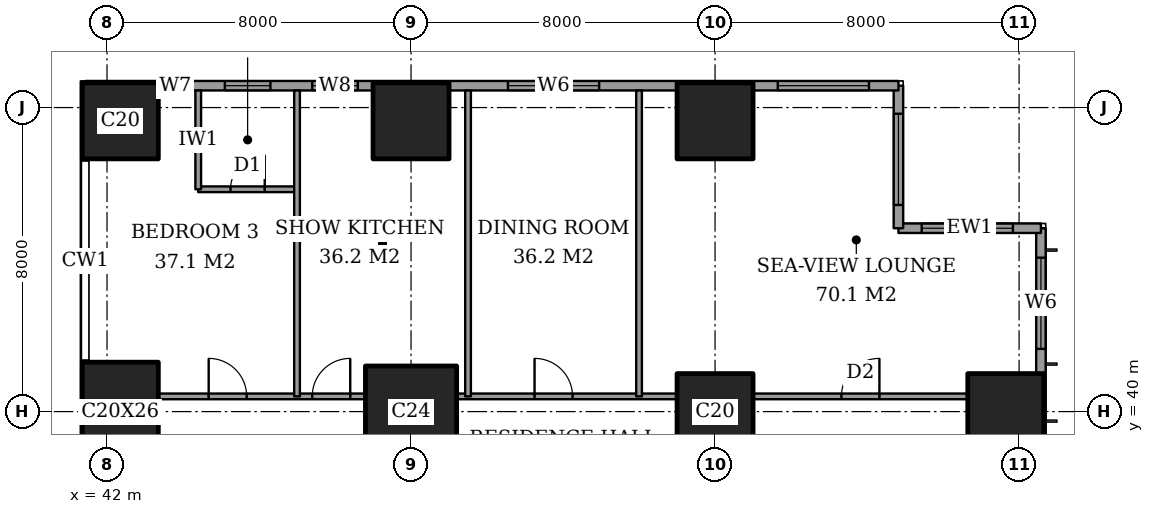
"""IFC4 building model, lengths in metres.
Left out: names, types, materials, properties, quantities, classifications, styles, units other than length and angle.
Written with IfcOpenShell. Run it as: python <this file> out.ifc"""

import sys

from ifc_helpers import new_model, si_unit, direction, frame, frame_2d, origin, origin_2d, place, context, subcontext, project, spatial, rectangle, extrude, element, fill, save


model = new_model("IFC4")
c1 = context("Model", 3, precision=1e-05, world=origin(), true_north=direction((0.0, 1.0)))
c2 = subcontext(c1, "Body", "Model", "MODEL_VIEW")
j1 = project(units=[si_unit("LENGTHUNIT", "METRE"), si_unit("PLANEANGLEUNIT", "RADIAN")], contexts=[c1])
p1 = place(None, origin())
s1 = spatial("IfcSite", under=j1, at=p1, CompositionType="ELEMENT")
p2 = place(p1, origin())
s2 = spatial("IfcBuilding", under=s1, at=p2, CompositionType="ELEMENT")
p3 = place(p2, frame((0.0, 0.0, 76.4)))
s3 = spatial("IfcBuildingStorey", under=s2, at=p3, CompositionType="ELEMENT", Elevation=76.4)
p4 = place(p3, frame((42.35, 40.0, 0.0), z_axis=(0.0, 0.0, 1.0), x_axis=(1.0, 0.0, 0.0)))
e1 = element("IfcColumn", 1, at=p4, inside=s3, PredefinedType="COLUMN", context=c2, shape_type="SweptSolid", body=[
    extrude(rectangle(XDim=2.0, YDim=2.6, at=origin_2d()), origin(), (0.0, 0.0, 1.0), 3.6),
])
p5 = place(p3, frame((42.35, 47.65, 0.0), z_axis=(0.0, 0.0, 1.0), x_axis=(1.0, 0.0, 0.0)))
e2 = element("IfcColumn", 2, at=p5, inside=s3, PredefinedType="COLUMN", context=c2, shape_type="SweptSolid", body=[
    extrude(rectangle(XDim=2.0, YDim=2.0, at=origin_2d()), origin(), (0.0, 0.0, 1.0), 3.6),
])
p6 = place(p3, frame((50.0, 40.0, 0.0), z_axis=(0.0, 0.0, 1.0), x_axis=(1.0, 0.0, 0.0)))
e3 = element("IfcColumn", 3, at=p6, inside=s3, PredefinedType="COLUMN", context=c2, shape_type="SweptSolid", body=[
    extrude(rectangle(XDim=2.4, YDim=2.4, at=origin_2d()), origin(), (0.0, 0.0, 1.0), 3.6),
])
for number, where, z_axis, x_axis in (
    (4, (50.0, 47.65, 0.0), (0.0, 0.0, 1.0), (1.0, 0.0, 0.0)),
    (5, (58.0, 40.0, 0.0), (0.0, 0.0, 1.0), (1.0, 0.0, 0.0)),
    (6, (58.0, 47.65, 0.0), (0.0, 0.0, 1.0), (1.0, 0.0, 0.0)),
    (7, (65.65, 40.0, 0.0), (0.0, 0.0, 1.0), (1.0, 0.0, 0.0)),
):
    element("IfcColumn", number, at=place(p3, frame(where, z_axis=z_axis, x_axis=x_axis)), inside=s3, PredefinedType="COLUMN", context=c2, shape_type="SweptSolid", body=[
        extrude(rectangle(XDim=2.0, YDim=2.0, at=origin_2d()), origin(), (0.0, 0.0, 1.0), 3.6),
    ])
p7 = place(p3, frame((66.575, 3.175, 0.0), z_axis=(0.0, 0.0, 1.0), x_axis=(0.0, 1.0, 0.0)))
e8 = element("IfcWall", 8, at=p7, inside=s3, PredefinedType="SOLIDWALL", context=c2, shape_type="SweptSolid", body=[
    extrude(rectangle(XDim=41.65, YDim=0.25, at=frame_2d((20.825, 0.0))), origin(), (0.0, 0.0, 1.0), 3.6),
])
p8 = place(p7, frame((0.775, 0.0, 0.6)))
e9 = element("IfcOpeningElement", 9, at=p8, cuts=e8, PredefinedType="OPENING", context=c2, shape_type="SweptSolid", body=[
    extrude(rectangle(XDim=2.4, YDim=2.0, at=frame_2d((1.2, 1.0))), frame((0.0, 0.135, 0.0), z_axis=(0.0, -1.0, 0.0), x_axis=(1.0, 0.0, 0.0)), (0.0, 0.0, 1.0), 0.27),
])
p9 = place(p7, frame((6.1, 0.0, 0.6)))
e10 = element("IfcOpeningElement", 10, at=p9, cuts=e8, PredefinedType="OPENING", context=c2, shape_type="SweptSolid", body=[
    extrude(rectangle(XDim=1.2, YDim=2.0, at=frame_2d((0.6, 1.0))), frame((0.0, 0.135, 0.0), z_axis=(0.0, -1.0, 0.0), x_axis=(1.0, 0.0, 0.0)), (0.0, 0.0, 1.0), 0.27),
])
p10 = place(p7, frame((8.275, 0.0, 0.6)))
e11 = element("IfcOpeningElement", 11, at=p10, cuts=e8, PredefinedType="OPENING", context=c2, shape_type="SweptSolid", body=[
    extrude(rectangle(XDim=2.4, YDim=2.0, at=frame_2d((1.2, 1.0))), frame((0.0, 0.135, 0.0), z_axis=(0.0, -1.0, 0.0), x_axis=(1.0, 0.0, 0.0)), (0.0, 0.0, 1.0), 0.27),
])
p11 = place(p7, frame((15.775, 0.0, 0.6)))
e12 = element("IfcOpeningElement", 12, at=p11, cuts=e8, PredefinedType="OPENING", context=c2, shape_type="SweptSolid", body=[
    extrude(rectangle(XDim=2.4, YDim=2.0, at=frame_2d((1.2, 1.0))), frame((0.0, 0.135, 0.0), z_axis=(0.0, -1.0, 0.0), x_axis=(1.0, 0.0, 0.0)), (0.0, 0.0, 1.0), 0.27),
])
p12 = place(p7, frame((23.475, 0.0, 0.6)))
e13 = element("IfcOpeningElement", 13, at=p12, cuts=e8, PredefinedType="OPENING", context=c2, shape_type="SweptSolid", body=[
    extrude(rectangle(XDim=2.4, YDim=2.0, at=frame_2d((1.2, 1.0))), frame((0.0, 0.135, 0.0), z_axis=(0.0, -1.0, 0.0), x_axis=(1.0, 0.0, 0.0)), (0.0, 0.0, 1.0), 0.27),
])
p13 = place(p7, frame((30.975, 0.0, 0.6)))
e14 = element("IfcOpeningElement", 14, at=p13, cuts=e8, PredefinedType="OPENING", context=c2, shape_type="SweptSolid", body=[
    extrude(rectangle(XDim=2.4, YDim=2.0, at=frame_2d((1.2, 1.0))), frame((0.0, 0.135, 0.0), z_axis=(0.0, -1.0, 0.0), x_axis=(1.0, 0.0, 0.0)), (0.0, 0.0, 1.0), 0.27),
])
p14 = place(p7, frame((34.5, 0.0, 0.6)))
e15 = element("IfcOpeningElement", 15, at=p14, cuts=e8, PredefinedType="OPENING", context=c2, shape_type="SweptSolid", body=[
    extrude(rectangle(XDim=1.2, YDim=2.0, at=frame_2d((0.6, 1.0))), frame((0.0, 0.135, 0.0), z_axis=(0.0, -1.0, 0.0), x_axis=(1.0, 0.0, 0.0)), (0.0, 0.0, 1.0), 0.27),
])
p15 = place(p7, frame((38.475, 0.0, 0.6)))
e16 = element("IfcOpeningElement", 16, at=p15, cuts=e8, PredefinedType="OPENING", context=c2, shape_type="SweptSolid", body=[
    extrude(rectangle(XDim=2.4, YDim=2.0, at=frame_2d((1.2, 1.0))), frame((0.0, 0.135, 0.0), z_axis=(0.0, -1.0, 0.0), x_axis=(1.0, 0.0, 0.0)), (0.0, 0.0, 1.0), 0.27),
])
p16 = place(p3, frame((66.575, 44.825, 0.0), z_axis=(0.0, 0.0, 1.0), x_axis=(-1.0, 0.0, 0.0)))
e17 = element("IfcWall", 17, at=p16, inside=s3, PredefinedType="SOLIDWALL", context=c2, shape_type="SweptSolid", body=[
    extrude(rectangle(XDim=3.75, YDim=0.25, at=frame_2d((1.875, 0.0))), origin(), (0.0, 0.0, 1.0), 3.6),
])
p17 = place(p16, frame((0.738, 0.0, 0.6)))
e18 = element("IfcOpeningElement", 18, at=p17, cuts=e17, PredefinedType="OPENING", context=c2, shape_type="SweptSolid", body=[
    extrude(rectangle(XDim=2.4, YDim=2.0, at=frame_2d((1.2, 1.0))), frame((0.0, 0.135, 0.0), z_axis=(0.0, -1.0, 0.0), x_axis=(1.0, 0.0, 0.0)), (0.0, 0.0, 1.0), 0.27),
])
p18 = place(p3, frame((62.825, 44.825, 0.0), z_axis=(0.0, 0.0, 1.0), x_axis=(0.0, 1.0, 0.0)))
e19 = element("IfcWall", 19, at=p18, inside=s3, PredefinedType="SOLIDWALL", context=c2, shape_type="SweptSolid", body=[
    extrude(rectangle(XDim=3.75, YDim=0.25, at=frame_2d((1.875, 0.0))), origin(), (0.0, 0.0, 1.0), 3.6),
])
p19 = place(p18, frame((0.613, 0.0, 0.6)))
e20 = element("IfcOpeningElement", 20, at=p19, cuts=e19, PredefinedType="OPENING", context=c2, shape_type="SweptSolid", body=[
    extrude(rectangle(XDim=2.4, YDim=2.0, at=frame_2d((1.2, 1.0))), frame((0.0, 0.135, 0.0), z_axis=(0.0, -1.0, 0.0), x_axis=(1.0, 0.0, 0.0)), (0.0, 0.0, 1.0), 0.27),
])
p20 = place(p3, frame((62.825, 48.575, 0.0), z_axis=(0.0, 0.0, 1.0), x_axis=(-1.0, 0.0, 0.0)))
e21 = element("IfcWall", 21, at=p20, inside=s3, PredefinedType="SOLIDWALL", context=c2, shape_type="SweptSolid", body=[
    extrude(rectangle(XDim=21.4, YDim=0.25, at=frame_2d((10.7, 0.0))), origin(), (0.0, 0.0, 1.0), 3.6),
])
p21 = place(p20, frame((0.775, 0.0, 0.6)))
e22 = element("IfcOpeningElement", 22, at=p21, cuts=e21, PredefinedType="OPENING", context=c2, shape_type="SweptSolid", body=[
    extrude(rectangle(XDim=2.4, YDim=2.0, at=frame_2d((1.2, 1.0))), frame((0.0, 0.135, 0.0), z_axis=(0.0, -1.0, 0.0), x_axis=(1.0, 0.0, 0.0)), (0.0, 0.0, 1.0), 0.27),
])
p22 = place(p20, frame((7.875, 0.0, 0.6)))
e23 = element("IfcOpeningElement", 23, at=p22, cuts=e21, PredefinedType="OPENING", context=c2, shape_type="SweptSolid", body=[
    extrude(rectangle(XDim=2.4, YDim=2.0, at=frame_2d((1.2, 1.0))), frame((0.0, 0.135, 0.0), z_axis=(0.0, -1.0, 0.0), x_axis=(1.0, 0.0, 0.0)), (0.0, 0.0, 1.0), 0.27),
])
p23 = place(p20, frame((14.225, 0.0, 0.6)))
e24 = element("IfcOpeningElement", 24, at=p23, cuts=e21, PredefinedType="OPENING", context=c2, shape_type="SweptSolid", body=[
    extrude(rectangle(XDim=1.2, YDim=2.0, at=frame_2d((0.6, 1.0))), frame((0.0, 0.135, 0.0), z_axis=(0.0, -1.0, 0.0), x_axis=(1.0, 0.0, 0.0)), (0.0, 0.0, 1.0), 0.27),
])
p24 = place(p20, frame((16.525, 0.0, 0.6)))
e25 = element("IfcOpeningElement", 25, at=p24, cuts=e21, PredefinedType="OPENING", context=c2, shape_type="SweptSolid", body=[
    extrude(rectangle(XDim=1.2, YDim=2.0, at=frame_2d((0.6, 1.0))), frame((0.0, 0.135, 0.0), z_axis=(0.0, -1.0, 0.0), x_axis=(1.0, 0.0, 0.0)), (0.0, 0.0, 1.0), 0.27),
])
p25 = place(p20, frame((18.725, 0.0, 0.6)))
e26 = element("IfcOpeningElement", 26, at=p25, cuts=e21, PredefinedType="OPENING", context=c2, shape_type="SweptSolid", body=[
    extrude(rectangle(XDim=0.6, YDim=2.0, at=frame_2d((0.3, 1.0))), frame((0.0, 0.135, 0.0), z_axis=(0.0, -1.0, 0.0), x_axis=(1.0, 0.0, 0.0)), (0.0, 0.0, 1.0), 0.27),
])
p26 = place(p3, frame((43.35, 40.4, 0.0), z_axis=(0.0, 0.0, 1.0), x_axis=(1.0, 0.0, 0.0)))
e27 = element("IfcWall", 27, at=p26, inside=s3, PredefinedType="PARTITIONING", context=c2, shape_type="SweptSolid", body=[
    extrude(rectangle(XDim=5.45, YDim=0.15, at=frame_2d((2.725, 0.0))), origin(), (0.0, 0.0, 1.0), 3.35),
])
p27 = place(p26, frame((4.05, 0.0, 0.0)))
e28 = element("IfcOpeningElement", 28, at=p27, cuts=e27, PredefinedType="OPENING", context=c2, shape_type="SweptSolid", body=[
    extrude(rectangle(XDim=1.0, YDim=2.1, at=frame_2d((0.5, 1.05))), frame((0.0, 0.085, 0.0), z_axis=(0.0, -1.0, 0.0), x_axis=(1.0, 0.0, 0.0)), (0.0, 0.0, 1.0), 0.17),
])
p28 = place(p26, frame((1.325, 0.0, 0.0)))
e29 = element("IfcOpeningElement", 29, at=p28, cuts=e27, PredefinedType="OPENING", context=c2, shape_type="SweptSolid", body=[
    extrude(rectangle(XDim=1.0, YDim=2.1, at=frame_2d((0.5, 1.05))), frame((0.0, 0.085, 0.0), z_axis=(0.0, -1.0, 0.0), x_axis=(1.0, 0.0, 0.0)), (0.0, 0.0, 1.0), 0.17),
])
p29 = place(p3, frame((51.2, 40.4, 0.0), z_axis=(0.0, 0.0, 1.0), x_axis=(1.0, 0.0, 0.0)))
e30 = element("IfcWall", 30, at=p29, inside=s3, PredefinedType="PARTITIONING", context=c2, shape_type="SweptSolid", body=[
    extrude(rectangle(XDim=5.8, YDim=0.15, at=frame_2d((2.9, 0.0))), origin(), (0.0, 0.0, 1.0), 3.35),
])
p30 = place(p29, frame((2.05, 0.0, 0.0)))
e31 = element("IfcOpeningElement", 31, at=p30, cuts=e30, PredefinedType="OPENING", context=c2, shape_type="SweptSolid", body=[
    extrude(rectangle(XDim=1.0, YDim=2.1, at=frame_2d((0.5, 1.05))), frame((0.0, 0.085, 0.0), z_axis=(0.0, -1.0, 0.0), x_axis=(1.0, 0.0, 0.0)), (0.0, 0.0, 1.0), 0.17),
])
p31 = place(p3, frame((59.0, 40.4, 0.0), z_axis=(0.0, 0.0, 1.0), x_axis=(1.0, 0.0, 0.0)))
e32 = element("IfcWall", 32, at=p31, inside=s3, PredefinedType="PARTITIONING", context=c2, shape_type="SweptSolid", body=[
    extrude(rectangle(XDim=5.65, YDim=0.15, at=frame_2d((2.825, 0.0))), origin(), (0.0, 0.0, 1.0), 3.35),
])
p32 = place(p31, frame((2.325, 0.0, 0.0)))
e33 = element("IfcOpeningElement", 33, at=p32, cuts=e32, PredefinedType="OPENING", context=c2, shape_type="SweptSolid", body=[
    extrude(rectangle(XDim=1.0, YDim=2.1, at=frame_2d((0.5, 1.05))), frame((0.0, 0.085, 0.0), z_axis=(0.0, -1.0, 0.0), x_axis=(1.0, 0.0, 0.0)), (0.0, 0.0, 1.0), 0.17),
])
p33 = place(p3, frame((44.4, 45.85, 0.0), z_axis=(0.0, 0.0, 1.0), x_axis=(1.0, 0.0, 0.0)))
e34 = element("IfcWall", 34, at=p33, inside=s3, PredefinedType="PARTITIONING", context=c2, shape_type="SweptSolid", body=[
    extrude(rectangle(XDim=2.6, YDim=0.15, at=frame_2d((1.3, 0.0))), origin(), (0.0, 0.0, 1.0), 3.35),
])
p34 = place(p33, frame((0.85, 0.0, 0.0)))
e35 = element("IfcOpeningElement", 35, at=p34, cuts=e34, PredefinedType="OPENING", context=c2, shape_type="SweptSolid", body=[
    extrude(rectangle(XDim=0.9, YDim=2.1, at=frame_2d((0.45, 1.05))), frame((0.0, 0.085, 0.0), z_axis=(0.0, -1.0, 0.0), x_axis=(1.0, 0.0, 0.0)), (0.0, 0.0, 1.0), 0.17),
])
p35 = place(p3, frame((44.4, 45.85, 0.0), z_axis=(0.0, 0.0, 1.0), x_axis=(0.0, 1.0, 0.0)))
e36 = element("IfcWall", 36, at=p35, inside=s3, PredefinedType="PARTITIONING", context=c2, shape_type="SweptSolid", body=[
    extrude(rectangle(XDim=2.6, YDim=0.15, at=frame_2d((1.3, 0.0))), origin(), (0.0, 0.0, 1.0), 3.35),
])
for number, where, z_axis, x_axis in (
    (37, (47.0, 40.4, 0.0), (0.0, 0.0, 1.0), (0.0, 1.0, 0.0)),
    (38, (51.5, 40.4, 0.0), (0.0, 0.0, 1.0), (0.0, 1.0, 0.0)),
    (39, (56.0, 40.4, 0.0), (0.0, 0.0, 1.0), (0.0, 1.0, 0.0)),
):
    element("IfcWall", number, at=place(p3, frame(where, z_axis=z_axis, x_axis=x_axis)), inside=s3, PredefinedType="PARTITIONING", context=c2, shape_type="SweptSolid", body=[
        extrude(rectangle(XDim=8.05, YDim=0.15, at=frame_2d((4.025, 0.0))), origin(), (0.0, 0.0, 1.0), 3.35),
    ])
p36 = place(p15, origin())
e40 = element("IfcWindow", 40, at=p36, inside=s3, PartitioningType="SINGLE_PANEL", PredefinedType="WINDOW", context=c2, shape_type="SweptSolid", body=[
    extrude(rectangle(XDim=2.4, YDim=2.0, at=frame_2d((1.2, 1.0))), frame((0.0, 0.03, 0.0), z_axis=(0.0, -1.0, 0.0), x_axis=(1.0, 0.0, 0.0)), (0.0, 0.0, 1.0), 0.06),
])
fill(e16, e40)
p37 = place(p17, origin())
e41 = element("IfcWindow", 41, at=p37, inside=s3, PartitioningType="SINGLE_PANEL", PredefinedType="WINDOW", context=c2, shape_type="SweptSolid", body=[
    extrude(rectangle(XDim=2.4, YDim=2.0, at=frame_2d((1.2, 1.0))), frame((0.0, 0.03, 0.0), z_axis=(0.0, -1.0, 0.0), x_axis=(1.0, 0.0, 0.0)), (0.0, 0.0, 1.0), 0.06),
])
fill(e18, e41)
p38 = place(p19, origin())
e42 = element("IfcWindow", 42, at=p38, inside=s3, PartitioningType="SINGLE_PANEL", PredefinedType="WINDOW", context=c2, shape_type="SweptSolid", body=[
    extrude(rectangle(XDim=2.4, YDim=2.0, at=frame_2d((1.2, 1.0))), frame((0.0, 0.03, 0.0), z_axis=(0.0, -1.0, 0.0), x_axis=(1.0, 0.0, 0.0)), (0.0, 0.0, 1.0), 0.06),
])
fill(e20, e42)
p39 = place(p21, origin())
e43 = element("IfcWindow", 43, at=p39, inside=s3, PartitioningType="SINGLE_PANEL", PredefinedType="WINDOW", context=c2, shape_type="SweptSolid", body=[
    extrude(rectangle(XDim=2.4, YDim=2.0, at=frame_2d((1.2, 1.0))), frame((0.0, 0.03, 0.0), z_axis=(0.0, -1.0, 0.0), x_axis=(1.0, 0.0, 0.0)), (0.0, 0.0, 1.0), 0.06),
])
fill(e22, e43)
p40 = place(p22, origin())
e44 = element("IfcWindow", 44, at=p40, inside=s3, PartitioningType="SINGLE_PANEL", PredefinedType="WINDOW", context=c2, shape_type="SweptSolid", body=[
    extrude(rectangle(XDim=2.4, YDim=2.0, at=frame_2d((1.2, 1.0))), frame((0.0, 0.03, 0.0), z_axis=(0.0, -1.0, 0.0), x_axis=(1.0, 0.0, 0.0)), (0.0, 0.0, 1.0), 0.06),
])
fill(e23, e44)
p41 = place(p23, origin())
e45 = element("IfcWindow", 45, at=p41, inside=s3, PartitioningType="SINGLE_PANEL", PredefinedType="WINDOW", context=c2, shape_type="SweptSolid", body=[
    extrude(rectangle(XDim=1.2, YDim=2.0, at=frame_2d((0.6, 1.0))), frame((0.0, 0.03, 0.0), z_axis=(0.0, -1.0, 0.0), x_axis=(1.0, 0.0, 0.0)), (0.0, 0.0, 1.0), 0.06),
])
fill(e24, e45)
p42 = place(p24, origin())
e46 = element("IfcWindow", 46, at=p42, inside=s3, PartitioningType="SINGLE_PANEL", PredefinedType="WINDOW", context=c2, shape_type="SweptSolid", body=[
    extrude(rectangle(XDim=1.2, YDim=2.0, at=frame_2d((0.6, 1.0))), frame((0.0, 0.03, 0.0), z_axis=(0.0, -1.0, 0.0), x_axis=(1.0, 0.0, 0.0)), (0.0, 0.0, 1.0), 0.06),
])
fill(e25, e46)
p43 = place(p25, origin())
e47 = element("IfcWindow", 47, at=p43, inside=s3, PartitioningType="SINGLE_PANEL", PredefinedType="WINDOW", context=c2, shape_type="SweptSolid", body=[
    extrude(rectangle(XDim=0.6, YDim=2.0, at=frame_2d((0.3, 1.0))), frame((0.0, 0.03, 0.0), z_axis=(0.0, -1.0, 0.0), x_axis=(1.0, 0.0, 0.0)), (0.0, 0.0, 1.0), 0.06),
])
fill(e26, e47)
p44 = place(p32, origin())
e48 = element("IfcDoor", 48, at=p44, inside=s3, OperationType="SINGLE_SWING_LEFT", PredefinedType="DOOR", context=c2, shape_type="SweptSolid", body=[
    extrude(rectangle(XDim=1.0, YDim=2.1, at=frame_2d((0.5, 1.05))), frame((0.0, 0.025, 0.0), z_axis=(0.0, -1.0, 0.0), x_axis=(1.0, 0.0, 0.0)), (0.0, 0.0, 1.0), 0.05),
])
fill(e33, e48)
p45 = place(p30, origin())
e49 = element("IfcDoor", 49, at=p45, inside=s3, OperationType="SINGLE_SWING_RIGHT", PredefinedType="DOOR", context=c2, shape_type="SweptSolid", body=[
    extrude(rectangle(XDim=1.0, YDim=2.1, at=frame_2d((0.5, 1.05))), frame((0.0, 0.025, 0.0), z_axis=(0.0, -1.0, 0.0), x_axis=(1.0, 0.0, 0.0)), (0.0, 0.0, 1.0), 0.05),
])
fill(e31, e49)
p46 = place(p27, origin())
e50 = element("IfcDoor", 50, at=p46, inside=s3, OperationType="SINGLE_SWING_LEFT", PredefinedType="DOOR", context=c2, shape_type="SweptSolid", body=[
    extrude(rectangle(XDim=1.0, YDim=2.1, at=frame_2d((0.5, 1.05))), frame((0.0, 0.025, 0.0), z_axis=(0.0, -1.0, 0.0), x_axis=(1.0, 0.0, 0.0)), (0.0, 0.0, 1.0), 0.05),
])
fill(e28, e50)
p47 = place(p34, origin())
e51 = element("IfcDoor", 51, at=p47, inside=s3, OperationType="SINGLE_SWING_LEFT", PredefinedType="DOOR", context=c2, shape_type="SweptSolid", body=[
    extrude(rectangle(XDim=0.9, YDim=2.1, at=frame_2d((0.45, 1.05))), frame((0.0, 0.025, 0.0), z_axis=(0.0, -1.0, 0.0), x_axis=(1.0, 0.0, 0.0)), (0.0, 0.0, 1.0), 0.05),
])
fill(e35, e51)
p48 = place(p28, origin())
e52 = element("IfcDoor", 52, at=p48, inside=s3, OperationType="SINGLE_SWING_RIGHT", PredefinedType="DOOR", context=c2, shape_type="SweptSolid", body=[
    extrude(rectangle(XDim=1.0, YDim=2.1, at=frame_2d((0.5, 1.05))), frame((0.0, 0.025, 0.0), z_axis=(0.0, -1.0, 0.0), x_axis=(1.0, 0.0, 0.0)), (0.0, 0.0, 1.0), 0.05),
])
fill(e29, e52)
save(model, sys.argv[1])
